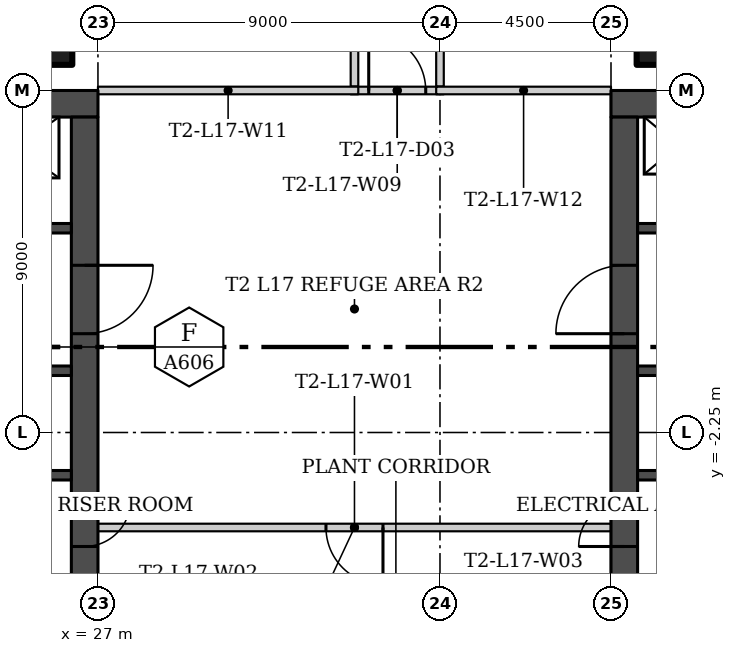
"""IFC4 building model, lengths in metres.
Left out: names, types, materials, properties, quantities, classifications, styles, units other than length and angle.
Written with IfcOpenShell. Run it as: python <this file> out.ifc"""

import sys

from ifc_helpers import new_model, si_unit, direction, frame, frame_2d, origin, origin_2d, place, context, subcontext, project, spatial, rectangle, hollow_rectangle, extrude, element, fill, save


model = new_model("IFC4")
c1 = context("Model", 3, precision=1e-05, world=origin(), true_north=direction((0.0, 1.0)))
c2 = subcontext(c1, "Body", "Model", "MODEL_VIEW")
j1 = project(units=[si_unit("LENGTHUNIT", "METRE"), si_unit("PLANEANGLEUNIT", "RADIAN")], contexts=[c1])
p1 = place(None, origin())
s1 = spatial("IfcSite", under=j1, at=p1, CompositionType="ELEMENT")
p2 = place(p1, origin())
s2 = spatial("IfcBuilding", under=s1, at=p2, CompositionType="ELEMENT")
p3 = place(p2, frame((0.0, 0.0, 77.1)))
s3 = spatial("IfcBuildingStorey", under=s2, at=p3, CompositionType="ELEMENT", Elevation=77.1)
for number, where in (
    (1, (25.625, 8.125, 0.0)),
    (2, (41.875, 8.125, 0.0)),
):
    element("IfcColumn", number, at=place(p3, frame(where)), inside=s3, PredefinedType="COLUMN", context=c2, shape_type="SweptSolid", body=[
        extrude(hollow_rectangle(XDim=1.4, YDim=1.4, WallThickness=0.05, at=origin_2d()), origin(), (0.0, 0.0, 1.0), 4.45),
    ])
p4 = place(p3, frame((40.5, -4.75, 0.0), z_axis=(0.0, 0.0, 1.0), x_axis=(-1.0, 0.0, 0.0)))
e3 = element("IfcWall", 3, at=p4, inside=s3, PredefinedType="PARTITIONING", context=c2, shape_type="SweptSolid", body=[
    extrude(rectangle(XDim=13.5, YDim=0.2, at=frame_2d((6.75, 0.0))), origin(), (0.0, 0.0, 1.0), 4.45),
])
p5 = place(p4, frame((6.0, 0.0, 0.0)))
e4 = element("IfcOpeningElement", 4, at=p5, cuts=e3, PredefinedType="OPENING", context=c2, shape_type="SweptSolid", body=[
    extrude(rectangle(XDim=1.5, YDim=2.4, at=frame_2d((0.75, 1.2))), frame((0.0, 0.11, 0.0), z_axis=(0.0, -1.0, 0.0), x_axis=(1.0, 0.0, 0.0)), (0.0, 0.0, 1.0), 0.22),
])
p6 = place(p3, frame((33.75, 6.85, 0.0), z_axis=(0.0, 0.0, 1.0), x_axis=(0.0, 1.0, 0.0)))
e5 = element("IfcWall", 5, at=p6, inside=s3, PredefinedType="PARTITIONING", context=c2, shape_type="SweptSolid", body=[
    extrude(rectangle(XDim=13.3, YDim=0.2, at=frame_2d((6.65, 0.0))), origin(), (0.0, 0.0, 1.0), 4.45),
])
p7 = place(p6, frame((8.15, 0.0, 0.0)))
e6 = element("IfcOpeningElement", 6, at=p7, cuts=e5, PredefinedType="OPENING", context=c2, shape_type="SweptSolid", body=[
    extrude(rectangle(XDim=1.5, YDim=2.4, at=frame_2d((0.75, 1.2))), frame((0.0, 0.11, 0.0), z_axis=(0.0, -1.0, 0.0), x_axis=(1.0, 0.0, 0.0)), (0.0, 0.0, 1.0), 0.22),
])
p8 = place(p6, frame((1.4, 0.0, 0.0)))
e7 = element("IfcOpeningElement", 7, at=p8, cuts=e5, PredefinedType="OPENING", context=c2, shape_type="SweptSolid", body=[
    extrude(rectangle(XDim=1.5, YDim=2.4, at=frame_2d((0.75, 1.2))), frame((0.0, 0.11, 0.0), z_axis=(0.0, -1.0, 0.0), x_axis=(1.0, 0.0, 0.0)), (0.0, 0.0, 1.0), 0.22),
])
p9 = place(p3, frame((36.0, 20.15, 0.0), z_axis=(0.0, 0.0, 1.0), x_axis=(0.0, -1.0, 0.0)))
e8 = element("IfcWall", 8, at=p9, inside=s3, PredefinedType="PARTITIONING", context=c2, shape_type="SweptSolid", body=[
    extrude(rectangle(XDim=13.3, YDim=0.2, at=frame_2d((6.65, 0.0))), origin(), (0.0, 0.0, 1.0), 4.45),
])
p10 = place(p9, frame((10.4, 0.0, 0.0)))
e9 = element("IfcOpeningElement", 9, at=p10, cuts=e8, PredefinedType="OPENING", context=c2, shape_type="SweptSolid", body=[
    extrude(rectangle(XDim=1.5, YDim=2.4, at=frame_2d((0.75, 1.2))), frame((0.0, 0.11, 0.0), z_axis=(0.0, -1.0, 0.0), x_axis=(1.0, 0.0, 0.0)), (0.0, 0.0, 1.0), 0.22),
])
p11 = place(p9, frame((3.65, 0.0, 0.0)))
e10 = element("IfcOpeningElement", 10, at=p11, cuts=e8, PredefinedType="OPENING", context=c2, shape_type="SweptSolid", body=[
    extrude(rectangle(XDim=1.5, YDim=2.4, at=frame_2d((0.75, 1.2))), frame((0.0, 0.11, 0.0), z_axis=(0.0, -1.0, 0.0), x_axis=(1.0, 0.0, 0.0)), (0.0, 0.0, 1.0), 0.22),
])
p12 = place(p3, frame((33.65, 6.75, 0.0)))
e11 = element("IfcWall", 11, at=p12, inside=s3, PredefinedType="PARTITIONING", context=c2, shape_type="SweptSolid", body=[
    extrude(rectangle(XDim=2.45, YDim=0.2, at=frame_2d((1.225, 0.0))), origin(), (0.0, 0.0, 1.0), 4.45),
])
p13 = place(p12, frame((0.475, 0.0, 0.0)))
e12 = element("IfcOpeningElement", 12, at=p13, cuts=e11, PredefinedType="OPENING", context=c2, shape_type="SweptSolid", body=[
    extrude(rectangle(XDim=1.5, YDim=2.4, at=frame_2d((0.75, 1.2))), frame((0.0, 0.11, 0.0), z_axis=(0.0, -1.0, 0.0), x_axis=(1.0, 0.0, 0.0)), (0.0, 0.0, 1.0), 0.22),
])
p14 = place(p3, frame((33.85, 6.75, 0.0), z_axis=(0.0, 0.0, 1.0), x_axis=(-1.0, 0.0, 0.0)))
e13 = element("IfcWall", 13, at=p14, inside=s3, PredefinedType="PARTITIONING", context=c2, shape_type="SweptSolid", body=[
    extrude(rectangle(XDim=6.85, YDim=0.2, at=frame_2d((3.425, 0.0))), origin(), (0.0, 0.0, 1.0), 4.45),
])
p15 = place(p3, frame((40.5, 6.75, 0.0), z_axis=(0.0, 0.0, 1.0), x_axis=(-1.0, 0.0, 0.0)))
e14 = element("IfcWall", 14, at=p15, inside=s3, PredefinedType="PARTITIONING", context=c2, shape_type="SweptSolid", body=[
    extrude(rectangle(XDim=4.6, YDim=0.2, at=frame_2d((2.3, 0.0))), origin(), (0.0, 0.0, 1.0), 4.45),
])
p16 = place(p3, frame((13.5, 6.4, 0.0)))
e15 = element("IfcWall", 15, at=p16, inside=s3, PredefinedType="SHEAR", context=c2, shape_type="SweptSolid", body=[
    extrude(rectangle(XDim=13.5, YDim=0.7, at=frame_2d((6.75, 0.0))), origin(), (0.0, 0.0, 1.0), 4.45),
])
p17 = place(p3, frame((26.65, 6.05, 0.0), z_axis=(0.0, 0.0, 1.0), x_axis=(0.0, -1.0, 0.0)))
e16 = element("IfcWall", 16, at=p17, inside=s3, PredefinedType="SHEAR", context=c2, shape_type="SweptSolid", body=[
    extrude(rectangle(XDim=12.1, YDim=0.7, at=frame_2d((6.05, 0.0))), origin(), (0.0, 0.0, 1.0), 4.45),
])
p18 = place(p17, frame((10.1, 0.0, 0.0)))
e17 = element("IfcOpeningElement", 17, at=p18, cuts=e16, PredefinedType="OPENING", context=c2, shape_type="SweptSolid", body=[
    extrude(rectangle(XDim=1.2, YDim=2.1, at=frame_2d((0.6, 1.05))), frame((0.0, 0.36, 0.0), z_axis=(0.0, -1.0, 0.0), x_axis=(1.0, 0.0, 0.0)), (0.0, 0.0, 1.0), 0.72),
])
p19 = place(p17, frame((3.9, 0.0, 0.0)))
e18 = element("IfcOpeningElement", 18, at=p19, cuts=e16, PredefinedType="OPENING", context=c2, shape_type="SweptSolid", body=[
    extrude(rectangle(XDim=1.8, YDim=2.4, at=frame_2d((0.9, 1.2))), frame((0.0, 0.36, 0.0), z_axis=(0.0, -1.0, 0.0), x_axis=(1.0, 0.0, 0.0)), (0.0, 0.0, 1.0), 0.72),
])
p20 = place(p3, frame((26.3, -3.375, 0.0), z_axis=(0.0, 0.0, 1.0), x_axis=(-1.0, 0.0, 0.0)))
e19 = element("IfcWall", 19, at=p20, inside=s3, PredefinedType="SHEAR", context=c2, shape_type="SweptSolid", body=[
    extrude(rectangle(XDim=12.1, YDim=0.25, at=frame_2d((6.05, 0.0))), origin(), (0.0, 0.0, 1.0), 4.45),
])
p21 = place(p20, frame((10.95, 0.0, 0.0)))
e20 = element("IfcOpeningElement", 20, at=p21, cuts=e19, PredefinedType="OPENING", context=c2, shape_type="SweptSolid", body=[
    extrude(rectangle(XDim=1.1, YDim=2.1, at=frame_2d((0.55, 1.05))), frame((0.0, 0.135, 0.0), z_axis=(0.0, -1.0, 0.0), x_axis=(1.0, 0.0, 0.0)), (0.0, 0.0, 1.0), 0.27),
])
p22 = place(p3, frame((26.3, -0.625, 0.0), z_axis=(0.0, 0.0, 1.0), x_axis=(-1.0, 0.0, 0.0)))
e21 = element("IfcWall", 21, at=p22, inside=s3, PredefinedType="SHEAR", context=c2, shape_type="SweptSolid", body=[
    extrude(rectangle(XDim=12.1, YDim=0.25, at=frame_2d((6.05, 0.0))), origin(), (0.0, 0.0, 1.0), 4.45),
])
p23 = place(p22, frame((8.65, 0.0, 0.0)))
e22 = element("IfcOpeningElement", 22, at=p23, cuts=e21, PredefinedType="OPENING", context=c2, shape_type="SweptSolid", body=[
    extrude(rectangle(XDim=1.2, YDim=2.1, at=frame_2d((0.6, 1.05))), frame((0.0, 0.135, 0.0), z_axis=(0.0, -1.0, 0.0), x_axis=(1.0, 0.0, 0.0)), (0.0, 0.0, 1.0), 0.27),
])
p24 = place(p22, frame((1.175, 0.0, 0.0)))
e23 = element("IfcOpeningElement", 23, at=p24, cuts=e21, PredefinedType="OPENING", context=c2, shape_type="SweptSolid", body=[
    extrude(rectangle(XDim=0.9, YDim=2.1, at=frame_2d((0.45, 1.05))), frame((0.0, 0.135, 0.0), z_axis=(0.0, -1.0, 0.0), x_axis=(1.0, 0.0, 0.0)), (0.0, 0.0, 1.0), 0.27),
])
p25 = place(p3, frame((14.2, 3.125, 0.0)))
e24 = element("IfcWall", 24, at=p25, inside=s3, PredefinedType="SHEAR", context=c2, shape_type="SweptSolid", body=[
    extrude(rectangle(XDim=12.1, YDim=0.25, at=frame_2d((6.05, 0.0))), origin(), (0.0, 0.0, 1.0), 4.45),
])
p26 = place(p25, frame((0.85, 0.0, 0.0)))
e25 = element("IfcOpeningElement", 25, at=p26, cuts=e24, PredefinedType="OPENING", context=c2, shape_type="SweptSolid", body=[
    extrude(rectangle(XDim=1.1, YDim=2.1, at=frame_2d((0.55, 1.05))), frame((0.0, 0.135, 0.0), z_axis=(0.0, -1.0, 0.0), x_axis=(1.0, 0.0, 0.0)), (0.0, 0.0, 1.0), 0.27),
])
p27 = place(p25, frame((3.9, 0.0, 0.0)))
e26 = element("IfcOpeningElement", 26, at=p27, cuts=e24, PredefinedType="OPENING", context=c2, shape_type="SweptSolid", body=[
    extrude(rectangle(XDim=1.1, YDim=2.1, at=frame_2d((0.55, 1.05))), frame((0.0, 0.135, 0.0), z_axis=(0.0, -1.0, 0.0), x_axis=(1.0, 0.0, 0.0)), (0.0, 0.0, 1.0), 0.27),
])
p28 = place(p3, frame((54.0, 6.4, 0.0), z_axis=(0.0, 0.0, 1.0), x_axis=(-1.0, 0.0, 0.0)))
e27 = element("IfcWall", 27, at=p28, inside=s3, PredefinedType="SHEAR", context=c2, shape_type="SweptSolid", body=[
    extrude(rectangle(XDim=13.5, YDim=0.7, at=frame_2d((6.75, 0.0))), origin(), (0.0, 0.0, 1.0), 4.45),
])
p29 = place(p3, frame((40.85, -6.05, 0.0), z_axis=(0.0, 0.0, 1.0), x_axis=(0.0, 1.0, 0.0)))
e28 = element("IfcWall", 28, at=p29, inside=s3, PredefinedType="SHEAR", context=c2, shape_type="SweptSolid", body=[
    extrude(rectangle(XDim=12.1, YDim=0.7, at=frame_2d((6.05, 0.0))), origin(), (0.0, 0.0, 1.0), 4.45),
])
p30 = place(p29, frame((0.8, 0.0, 0.0)))
e29 = element("IfcOpeningElement", 29, at=p30, cuts=e28, PredefinedType="OPENING", context=c2, shape_type="SweptSolid", body=[
    extrude(rectangle(XDim=1.2, YDim=2.1, at=frame_2d((0.6, 1.05))), frame((0.0, 0.36, 0.0), z_axis=(0.0, -1.0, 0.0), x_axis=(1.0, 0.0, 0.0)), (0.0, 0.0, 1.0), 0.72),
])
p31 = place(p29, frame((6.4, 0.0, 0.0)))
e30 = element("IfcOpeningElement", 30, at=p31, cuts=e28, PredefinedType="OPENING", context=c2, shape_type="SweptSolid", body=[
    extrude(rectangle(XDim=1.8, YDim=2.4, at=frame_2d((0.9, 1.2))), frame((0.0, 0.36, 0.0), z_axis=(0.0, -1.0, 0.0), x_axis=(1.0, 0.0, 0.0)), (0.0, 0.0, 1.0), 0.72),
])
p32 = place(p3, frame((53.3, -3.375, 0.0), z_axis=(0.0, 0.0, 1.0), x_axis=(-1.0, 0.0, 0.0)))
e31 = element("IfcWall", 31, at=p32, inside=s3, PredefinedType="SHEAR", context=c2, shape_type="SweptSolid", body=[
    extrude(rectangle(XDim=12.1, YDim=0.25, at=frame_2d((6.05, 0.0))), origin(), (0.0, 0.0, 1.0), 4.45),
])
p33 = place(p32, frame((0.05, 0.0, 0.0)))
e32 = element("IfcOpeningElement", 32, at=p33, cuts=e31, PredefinedType="OPENING", context=c2, shape_type="SweptSolid", body=[
    extrude(rectangle(XDim=1.1, YDim=2.1, at=frame_2d((0.55, 1.05))), frame((0.0, 0.135, 0.0), z_axis=(0.0, -1.0, 0.0), x_axis=(1.0, 0.0, 0.0)), (0.0, 0.0, 1.0), 0.27),
])
p34 = place(p3, frame((53.3, -0.625, 0.0), z_axis=(0.0, 0.0, 1.0), x_axis=(-1.0, 0.0, 0.0)))
e33 = element("IfcWall", 33, at=p34, inside=s3, PredefinedType="SHEAR", context=c2, shape_type="SweptSolid", body=[
    extrude(rectangle(XDim=12.1, YDim=0.25, at=frame_2d((6.05, 0.0))), origin(), (0.0, 0.0, 1.0), 4.45),
])
p35 = place(p34, frame((2.25, 0.0, 0.0)))
e34 = element("IfcOpeningElement", 34, at=p35, cuts=e33, PredefinedType="OPENING", context=c2, shape_type="SweptSolid", body=[
    extrude(rectangle(XDim=1.2, YDim=2.1, at=frame_2d((0.6, 1.05))), frame((0.0, 0.135, 0.0), z_axis=(0.0, -1.0, 0.0), x_axis=(1.0, 0.0, 0.0)), (0.0, 0.0, 1.0), 0.27),
])
p36 = place(p34, frame((10.025, 0.0, 0.0)))
e35 = element("IfcOpeningElement", 35, at=p36, cuts=e33, PredefinedType="OPENING", context=c2, shape_type="SweptSolid", body=[
    extrude(rectangle(XDim=0.9, YDim=2.1, at=frame_2d((0.45, 1.05))), frame((0.0, 0.135, 0.0), z_axis=(0.0, -1.0, 0.0), x_axis=(1.0, 0.0, 0.0)), (0.0, 0.0, 1.0), 0.27),
])
p37 = place(p3, frame((46.0, 3.125, 0.0), z_axis=(0.0, 0.0, 1.0), x_axis=(-1.0, 0.0, 0.0)))
e36 = element("IfcWall", 36, at=p37, inside=s3, PredefinedType="SHEAR", context=c2, shape_type="SweptSolid", body=[
    extrude(rectangle(XDim=4.8, YDim=0.25, at=frame_2d((2.4, 0.0))), origin(), (0.0, 0.0, 1.0), 4.45),
])
p38 = place(p37, frame((0.775, 0.0, 0.0)))
e37 = element("IfcOpeningElement", 37, at=p38, cuts=e36, PredefinedType="OPENING", context=c2, shape_type="SweptSolid", body=[
    extrude(rectangle(XDim=1.1, YDim=2.1, at=frame_2d((0.55, 1.05))), frame((0.0, 0.135, 0.0), z_axis=(0.0, -1.0, 0.0), x_axis=(1.0, 0.0, 0.0)), (0.0, 0.0, 1.0), 0.27),
])
p39 = place(p13, origin())
e38 = element("IfcDoor", 38, at=p39, inside=s3, OperationType="DOUBLE_DOOR_SINGLE_SWING", PredefinedType="DOOR", context=c2, shape_type="SweptSolid", body=[
    extrude(rectangle(XDim=1.5, YDim=2.4, at=frame_2d((0.75, 1.2))), frame((0.0, 0.025, 0.0), z_axis=(0.0, -1.0, 0.0), x_axis=(1.0, 0.0, 0.0)), (0.0, 0.0, 1.0), 0.05),
])
fill(e12, e38)
p40 = place(p5, origin())
e39 = element("IfcDoor", 39, at=p40, inside=s3, OperationType="DOUBLE_DOOR_SINGLE_SWING", PredefinedType="DOOR", context=c2, shape_type="SweptSolid", body=[
    extrude(rectangle(XDim=1.5, YDim=2.4, at=frame_2d((0.75, 1.2))), frame((0.0, 0.025, 0.0), z_axis=(0.0, -1.0, 0.0), x_axis=(1.0, 0.0, 0.0)), (0.0, 0.0, 1.0), 0.05),
])
fill(e4, e39)
p41 = place(p18, origin())
e40 = element("IfcDoor", 40, at=p41, inside=s3, OperationType="SINGLE_SWING_RIGHT", PredefinedType="DOOR", context=c2, shape_type="SweptSolid", body=[
    extrude(rectangle(XDim=1.2, YDim=2.1, at=frame_2d((0.6, 1.05))), frame((0.0, 0.025, 0.0), z_axis=(0.0, -1.0, 0.0), x_axis=(1.0, 0.0, 0.0)), (0.0, 0.0, 1.0), 0.05),
])
fill(e17, e40)
p42 = place(p19, origin())
e41 = element("IfcDoor", 41, at=p42, inside=s3, OperationType="DOUBLE_DOOR_SINGLE_SWING", PredefinedType="DOOR", context=c2, shape_type="SweptSolid", body=[
    extrude(rectangle(XDim=1.8, YDim=2.4, at=frame_2d((0.9, 1.2))), frame((0.0, 0.025, 0.0), z_axis=(0.0, -1.0, 0.0), x_axis=(1.0, 0.0, 0.0)), (0.0, 0.0, 1.0), 0.05),
])
fill(e18, e41)
p43 = place(p30, origin())
e42 = element("IfcDoor", 42, at=p43, inside=s3, OperationType="SINGLE_SWING_LEFT", PredefinedType="DOOR", context=c2, shape_type="SweptSolid", body=[
    extrude(rectangle(XDim=1.2, YDim=2.1, at=frame_2d((0.6, 1.05))), frame((0.0, 0.025, 0.0), z_axis=(0.0, -1.0, 0.0), x_axis=(1.0, 0.0, 0.0)), (0.0, 0.0, 1.0), 0.05),
])
fill(e29, e42)
p44 = place(p31, origin())
e43 = element("IfcDoor", 43, at=p44, inside=s3, OperationType="DOUBLE_DOOR_SINGLE_SWING", PredefinedType="DOOR", context=c2, shape_type="SweptSolid", body=[
    extrude(rectangle(XDim=1.8, YDim=2.4, at=frame_2d((0.9, 1.2))), frame((0.0, 0.025, 0.0), z_axis=(0.0, -1.0, 0.0), x_axis=(1.0, 0.0, 0.0)), (0.0, 0.0, 1.0), 0.05),
])
fill(e30, e43)
save(model, sys.argv[1])
